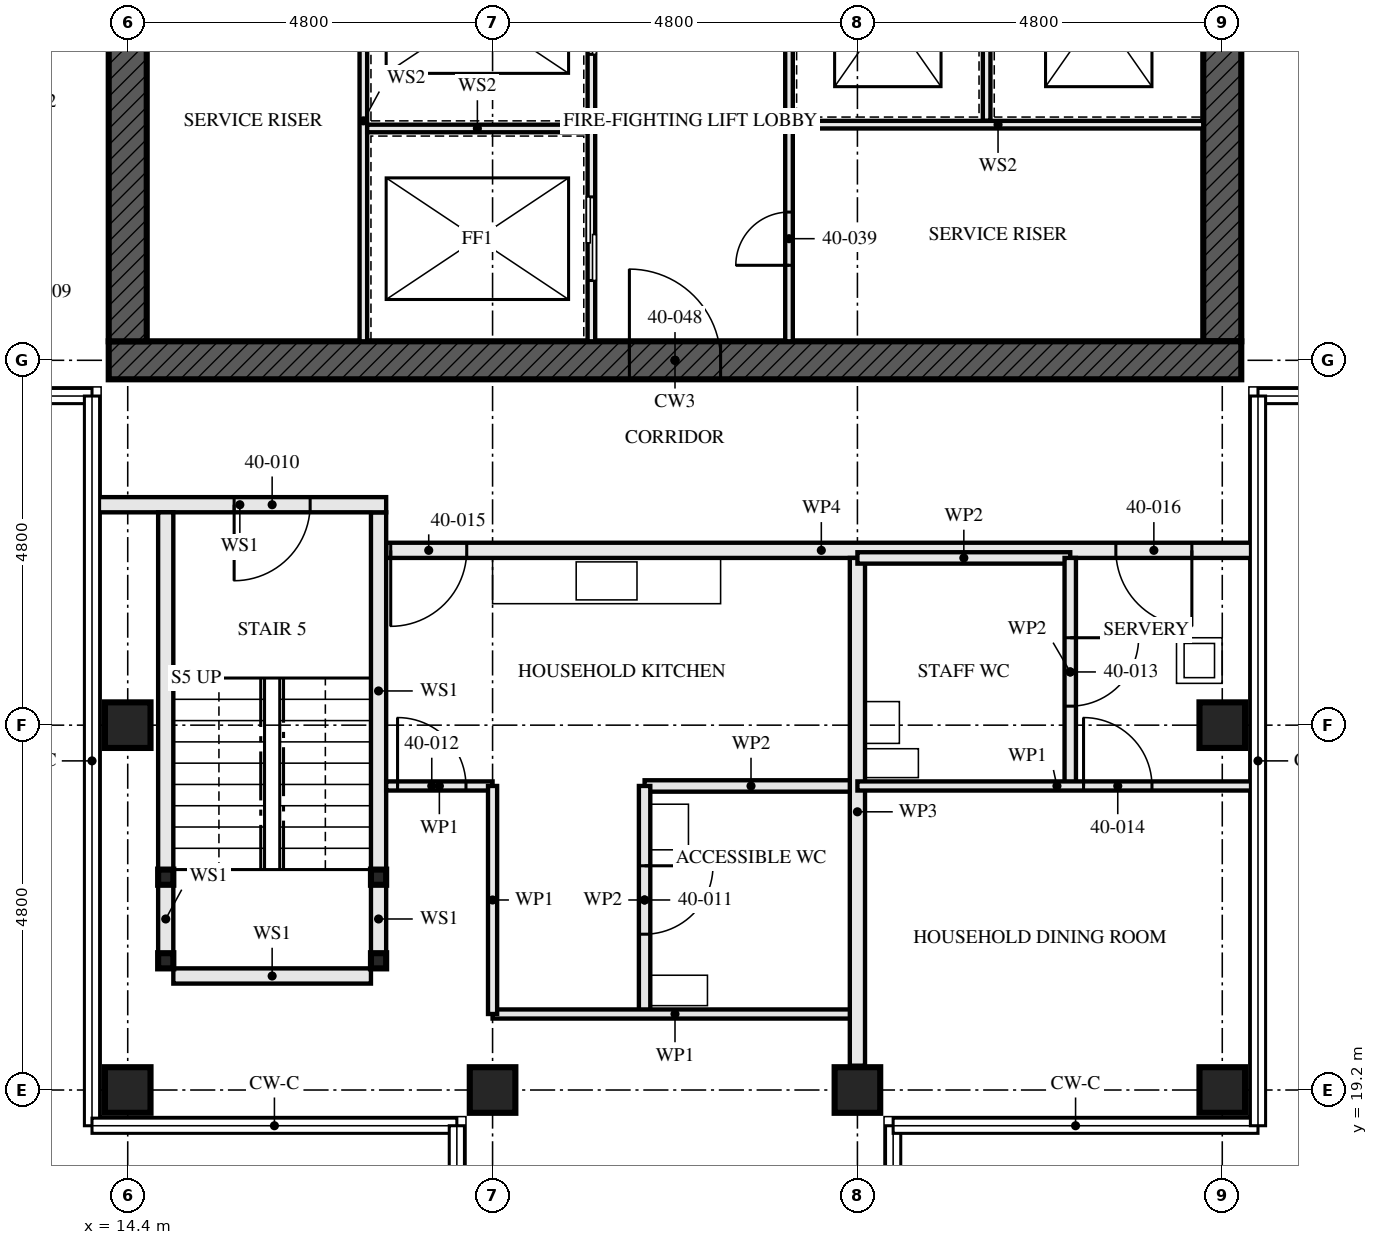
"""IFC4 building model, lengths in metres.
Left out: names, types, materials, properties, quantities, classifications, styles, units other than length and angle.
Written with IfcOpenShell. Run it as: python <this file> out.ifc"""

import sys

from ifc_helpers import new_model, si_unit, direction, frame, frame_2d, origin, origin_2d, place, context, subcontext, project, spatial, rectangle, hollow_rectangle, extrude, element, fill, save


model = new_model("IFC4")
c1 = context("Model", 3, precision=1e-05, world=origin(), true_north=direction((0.0, 1.0)))
c2 = subcontext(c1, "Body", "Model", "MODEL_VIEW")
j1 = project(units=[si_unit("LENGTHUNIT", "METRE"), si_unit("PLANEANGLEUNIT", "RADIAN")], contexts=[c1])
p1 = place(None, origin())
s1 = spatial("IfcSite", under=j1, at=p1, CompositionType="ELEMENT")
p2 = place(p1, origin())
s2 = spatial("IfcBuilding", under=s1, at=p2, CompositionType="ELEMENT")
p3 = place(p2, frame((0.0, 0.0, 148.0)))
s3 = spatial("IfcBuildingStorey", under=s2, at=p3, CompositionType="ELEMENT", Elevation=148.0)
for number, where, z_axis, x_axis in (
    (1, (14.4, 19.2, 0.0), (0.0, 0.0, 1.0), (0.0, 1.0, 0.0)),
    (2, (14.4, 24.0, 0.0), (0.0, 0.0, 1.0), (1.0, 0.0, 0.0)),
    (3, (19.2, 19.2, 0.0), (0.0, 0.0, 1.0), (0.0, 1.0, 0.0)),
    (4, (24.0, 19.2, 0.0), (0.0, 0.0, 1.0), (0.0, 1.0, 0.0)),
    (5, (28.8, 19.2, 0.0), (0.0, 0.0, 1.0), (0.0, 1.0, 0.0)),
    (6, (28.8, 24.0, 0.0), (0.0, 0.0, 1.0), (1.0, 0.0, 0.0)),
):
    element("IfcColumn", number, at=place(p3, frame(where, z_axis=z_axis, x_axis=x_axis)), inside=s3, PredefinedType="COLUMN", context=c2, shape_type="SweptSolid", body=[
        extrude(hollow_rectangle(XDim=0.6, YDim=0.6, WallThickness=0.08, at=origin_2d()), origin(), (0.0, 0.0, 1.0), 3.5),
    ])
p4 = place(p3, frame((14.15, 28.8, -0.17), z_axis=(0.0, 0.0, 1.0), x_axis=(1.0, 0.0, 0.0)))
e7 = element("IfcWall", 7, at=p4, inside=s3, PredefinedType="SHEAR", context=c2, shape_type="SweptSolid", body=[
    extrude(rectangle(XDim=14.9, YDim=0.5, at=frame_2d((7.45, 0.0))), origin(), (0.0, 0.0, 1.0), 3.5),
])
p5 = place(p4, frame((6.85, 0.0, 0.17)))
e8 = element("IfcOpeningElement", 8, at=p5, cuts=e7, PredefinedType="OPENING", context=c2, shape_type="SweptSolid", body=[
    extrude(rectangle(XDim=1.2, YDim=2.1, at=frame_2d((0.6, 1.05))), frame((0.0, 0.26, 0.0), z_axis=(0.0, -1.0, 0.0), x_axis=(1.0, 0.0, 0.0)), (0.0, 0.0, 1.0), 0.521),
])
p6 = place(p3, frame((14.4, 42.95, -0.17), z_axis=(0.0, 0.0, 1.0), x_axis=(0.0, -1.0, 0.0)))
e9 = element("IfcWall", 9, at=p6, inside=s3, PredefinedType="SHEAR", context=c2, shape_type="SweptSolid", body=[
    extrude(rectangle(XDim=13.9, YDim=0.5, at=frame_2d((6.95, 0.0))), origin(), (0.0, 0.0, 1.0), 3.5),
])
p7 = place(p6, frame((6.35, 0.0, 0.17)))
e10 = element("IfcOpeningElement", 10, at=p7, cuts=e9, PredefinedType="OPENING", context=c2, shape_type="SweptSolid", body=[
    extrude(rectangle(XDim=1.2, YDim=2.1, at=frame_2d((0.6, 1.05))), frame((0.0, 0.26, 0.0), z_axis=(0.0, -1.0, 0.0), x_axis=(1.0, 0.0, 0.0)), (0.0, 0.0, 1.0), 0.521),
])
p8 = place(p3, frame((28.8, 29.05, -0.17), z_axis=(0.0, 0.0, 1.0), x_axis=(0.0, 1.0, 0.0)))
e11 = element("IfcWall", 11, at=p8, inside=s3, PredefinedType="SHEAR", context=c2, shape_type="SweptSolid", body=[
    extrude(rectangle(XDim=13.9, YDim=0.5, at=frame_2d((6.95, 0.0))), origin(), (0.0, 0.0, 1.0), 3.5),
])
p9 = place(p8, frame((6.35, 0.0, 0.17)))
e12 = element("IfcOpeningElement", 12, at=p9, cuts=e11, PredefinedType="OPENING", context=c2, shape_type="SweptSolid", body=[
    extrude(rectangle(XDim=1.2, YDim=2.1, at=frame_2d((0.6, 1.05))), frame((0.0, 0.26, 0.0), z_axis=(0.0, -1.0, 0.0), x_axis=(1.0, 0.0, 0.0)), (0.0, 0.0, 1.0), 0.521),
])
for number, where, z_axis, x_axis in (
    (13, (14.9, 20.9, 0.0), (0.0, 0.0, 1.0), (1.0, 0.0, 0.0)),
    (14, (17.7, 20.9, 0.0), (0.0, 0.0, 1.0), (1.0, 0.0, 0.0)),
    (15, (14.9, 22.0, 0.0), (0.0, 0.0, 1.0), (1.0, 0.0, 0.0)),
    (16, (17.7, 22.0, 0.0), (0.0, 0.0, 1.0), (1.0, 0.0, 0.0)),
):
    element("IfcColumn", number, at=place(p3, frame(where, z_axis=z_axis, x_axis=x_axis)), inside=s3, PredefinedType="COLUMN", context=c2, shape_type="SweptSolid", body=[
        extrude(hollow_rectangle(XDim=0.2, YDim=0.2, WallThickness=0.008, at=origin_2d()), origin(), (0.0, 0.0, 1.0), 3.33),
    ])
p10 = place(p3, frame((14.9, 21.0, 0.0), z_axis=(0.0, 0.0, 1.0), x_axis=(0.0, 1.0, 0.0)))
e17 = element("IfcWall", 17, at=p10, inside=s3, PredefinedType="SOLIDWALL", context=c2, shape_type="SweptSolid", body=[
    extrude(rectangle(XDim=0.9, YDim=0.2, at=frame_2d((0.45, 0.0))), origin(), (0.0, 0.0, 1.0), 2.99),
])
p11 = place(p3, frame((14.9, 22.1, 0.0), z_axis=(0.0, 0.0, 1.0), x_axis=(0.0, 1.0, 0.0)))
e18 = element("IfcWall", 18, at=p11, inside=s3, PredefinedType="SOLIDWALL", context=c2, shape_type="SweptSolid", body=[
    extrude(rectangle(XDim=4.7, YDim=0.2, at=frame_2d((2.35, 0.0))), origin(), (0.0, 0.0, 1.0), 2.99),
])
p12 = place(p3, frame((17.7, 21.0, 0.0), z_axis=(0.0, 0.0, 1.0), x_axis=(0.0, 1.0, 0.0)))
e19 = element("IfcWall", 19, at=p12, inside=s3, PredefinedType="SOLIDWALL", context=c2, shape_type="SweptSolid", body=[
    extrude(rectangle(XDim=0.9, YDim=0.2, at=frame_2d((0.45, 0.0))), origin(), (0.0, 0.0, 1.0), 2.99),
])
p13 = place(p3, frame((17.7, 22.1, 0.0), z_axis=(0.0, 0.0, 1.0), x_axis=(0.0, 1.0, 0.0)))
e20 = element("IfcWall", 20, at=p13, inside=s3, PredefinedType="SOLIDWALL", context=c2, shape_type="SweptSolid", body=[
    extrude(rectangle(XDim=4.7, YDim=0.2, at=frame_2d((2.35, 0.0))), origin(), (0.0, 0.0, 1.0), 2.99),
])
p14 = place(p3, frame((15.0, 20.7, 0.0), z_axis=(0.0, 0.0, 1.0), x_axis=(1.0, 0.0, 0.0)))
e21 = element("IfcWall", 21, at=p14, inside=s3, PredefinedType="SOLIDWALL", context=c2, shape_type="SweptSolid", body=[
    extrude(rectangle(XDim=2.6, YDim=0.2, at=frame_2d((1.3, 0.0))), origin(), (0.0, 0.0, 1.0), 3.33),
])
p15 = place(p3, frame((13.95, 26.9, 0.0), z_axis=(0.0, 0.0, 1.0), x_axis=(1.0, 0.0, 0.0)))
e22 = element("IfcWall", 22, at=p15, inside=s3, PredefinedType="SOLIDWALL", context=c2, shape_type="SweptSolid", body=[
    extrude(rectangle(XDim=3.85, YDim=0.2, at=frame_2d((1.925, 0.0))), origin(), (0.0, 0.0, 1.0), 2.32),
])
p16 = place(p15, frame((1.85, 0.0, 0.0)))
e23 = element("IfcOpeningElement", 23, at=p16, cuts=e22, PredefinedType="OPENING", context=c2, shape_type="SweptSolid", body=[
    extrude(rectangle(XDim=1.0, YDim=2.1, at=frame_2d((0.5, 1.05))), frame((0.0, 0.111, 0.0), z_axis=(0.0, -1.0, 0.0), x_axis=(1.0, 0.0, 0.0)), (0.0, 0.0, 1.0), 0.221),
])
p17 = place(p3, frame((21.2, 20.2, 0.0), z_axis=(0.0, 0.0, 1.0), x_axis=(0.0, 1.0, 0.0)))
e24 = element("IfcWall", 24, at=p17, inside=s3, PredefinedType="PARTITIONING", context=c2, shape_type="SweptSolid", body=[
    extrude(rectangle(XDim=3.0, YDim=0.15, at=frame_2d((1.5, 0.0))), origin(), (0.0, 0.0, 1.0), 3.33),
])
p18 = place(p17, frame((1.05, 0.0, 0.0)))
e25 = element("IfcOpeningElement", 25, at=p18, cuts=e24, PredefinedType="OPENING", context=c2, shape_type="SweptSolid", body=[
    extrude(rectangle(XDim=0.9, YDim=2.1, at=frame_2d((0.45, 1.05))), frame((0.0, 0.085, 0.0), z_axis=(0.0, -1.0, 0.0), x_axis=(1.0, 0.0, 0.0)), (0.0, 0.0, 1.0), 0.171),
])
p19 = place(p3, frame((21.2, 23.2, 0.0), z_axis=(0.0, 0.0, 1.0), x_axis=(1.0, 0.0, 0.0)))
e26 = element("IfcWall", 26, at=p19, inside=s3, PredefinedType="PARTITIONING", context=c2, shape_type="SweptSolid", body=[
    extrude(rectangle(XDim=2.8, YDim=0.15, at=frame_2d((1.4, 0.0))), origin(), (0.0, 0.0, 1.0), 3.33),
])
p20 = place(p3, frame((17.8, 23.2, 0.0), z_axis=(0.0, 0.0, 1.0), x_axis=(1.0, 0.0, 0.0)))
e27 = element("IfcWall", 27, at=p20, inside=s3, PredefinedType="PARTITIONING", context=c2, shape_type="SweptSolid", body=[
    extrude(rectangle(XDim=1.4, YDim=0.12, at=frame_2d((0.7, 0.0))), origin(), (0.0, 0.0, 1.0), 3.33),
])
p21 = place(p20, frame((0.15, 0.0, 0.0)))
e28 = element("IfcOpeningElement", 28, at=p21, cuts=e27, PredefinedType="OPENING", context=c2, shape_type="SweptSolid", body=[
    extrude(rectangle(XDim=0.9, YDim=2.1, at=frame_2d((0.45, 1.05))), frame((0.0, 0.071, 0.0), z_axis=(0.0, -1.0, 0.0), x_axis=(1.0, 0.0, 0.0)), (0.0, 0.0, 1.0), 0.141),
])
p22 = place(p3, frame((19.2, 20.2, 0.0), z_axis=(0.0, 0.0, 1.0), x_axis=(1.0, 0.0, 0.0)))
e29 = element("IfcWall", 29, at=p22, inside=s3, PredefinedType="PARTITIONING", context=c2, shape_type="SweptSolid", body=[
    extrude(rectangle(XDim=4.8, YDim=0.12, at=frame_2d((2.4, 0.0))), origin(), (0.0, 0.0, 1.0), 3.33),
])
p23 = place(p3, frame((19.2, 20.2, 0.0), z_axis=(0.0, 0.0, 1.0), x_axis=(0.0, 1.0, 0.0)))
e30 = element("IfcWall", 30, at=p23, inside=s3, PredefinedType="PARTITIONING", context=c2, shape_type="SweptSolid", body=[
    extrude(rectangle(XDim=3.0, YDim=0.12, at=frame_2d((1.5, 0.0))), origin(), (0.0, 0.0, 1.0), 2.55),
])
p24 = place(p3, frame((24.0, 19.52, 0.0), z_axis=(0.0, 0.0, 1.0), x_axis=(0.0, 1.0, 0.0)))
e31 = element("IfcWall", 31, at=p24, inside=s3, PredefinedType="PARTITIONING", context=c2, shape_type="SweptSolid", body=[
    extrude(rectangle(XDim=6.68, YDim=0.2, at=frame_2d((3.34, 0.0))), origin(), (0.0, 0.0, 1.0), 2.55),
])
p25 = place(p3, frame((26.8, 23.2, 0.0), z_axis=(0.0, 0.0, 1.0), x_axis=(0.0, 1.0, 0.0)))
e32 = element("IfcWall", 32, at=p25, inside=s3, PredefinedType="PARTITIONING", context=c2, shape_type="SweptSolid", body=[
    extrude(rectangle(XDim=3.0, YDim=0.15, at=frame_2d((1.5, 0.0))), origin(), (0.0, 0.0, 1.0), 2.55),
])
p26 = place(p25, frame((1.05, 0.0, 0.0)))
e33 = element("IfcOpeningElement", 33, at=p26, cuts=e32, PredefinedType="OPENING", context=c2, shape_type="SweptSolid", body=[
    extrude(rectangle(XDim=0.9, YDim=2.1, at=frame_2d((0.45, 1.05))), frame((0.0, 0.085, 0.0), z_axis=(0.0, -1.0, 0.0), x_axis=(1.0, 0.0, 0.0)), (0.0, 0.0, 1.0), 0.171),
])
p27 = place(p3, frame((24.0, 26.2, 0.0), z_axis=(0.0, 0.0, 1.0), x_axis=(1.0, 0.0, 0.0)))
e34 = element("IfcWall", 34, at=p27, inside=s3, PredefinedType="PARTITIONING", context=c2, shape_type="SweptSolid", body=[
    extrude(rectangle(XDim=2.8, YDim=0.15, at=frame_2d((1.4, 0.0))), origin(), (0.0, 0.0, 1.0), 3.33),
])
p28 = place(p3, frame((24.0, 23.2, 0.0), z_axis=(0.0, 0.0, 1.0), x_axis=(1.0, 0.0, 0.0)))
e35 = element("IfcWall", 35, at=p28, inside=s3, PredefinedType="PARTITIONING", context=c2, shape_type="SweptSolid", body=[
    extrude(rectangle(XDim=5.25, YDim=0.12, at=frame_2d((2.625, 0.0))), origin(), (0.0, 0.0, 1.0), 2.32),
])
p29 = place(p28, frame((2.975, 0.0, 0.0)))
e36 = element("IfcOpeningElement", 36, at=p29, cuts=e35, PredefinedType="OPENING", context=c2, shape_type="SweptSolid", body=[
    extrude(rectangle(XDim=0.9, YDim=2.1, at=frame_2d((0.45, 1.05))), frame((0.0, 0.071, 0.0), z_axis=(0.0, -1.0, 0.0), x_axis=(1.0, 0.0, 0.0)), (0.0, 0.0, 1.0), 0.141),
])
p30 = place(p3, frame((17.8, 26.3, 0.0), z_axis=(0.0, 0.0, 1.0), x_axis=(1.0, 0.0, 0.0)))
e37 = element("IfcWall", 37, at=p30, inside=s3, PredefinedType="PARTITIONING", context=c2, shape_type="SweptSolid", body=[
    extrude(rectangle(XDim=11.45, YDim=0.2, at=frame_2d((5.725, 0.0))), origin(), (0.0, 0.0, 1.0), 2.32),
])
p31 = place(p30, frame((0.06, 0.0, 0.0)))
e38 = element("IfcOpeningElement", 38, at=p31, cuts=e37, PredefinedType="OPENING", context=c2, shape_type="SweptSolid", body=[
    extrude(rectangle(XDim=1.0, YDim=2.1, at=frame_2d((0.5, 1.05))), frame((0.0, 0.111, 0.0), z_axis=(0.0, -1.0, 0.0), x_axis=(1.0, 0.0, 0.0)), (0.0, 0.0, 1.0), 0.221),
])
p32 = place(p30, frame((9.6, 0.0, 0.0)))
e39 = element("IfcOpeningElement", 39, at=p32, cuts=e37, PredefinedType="OPENING", context=c2, shape_type="SweptSolid", body=[
    extrude(rectangle(XDim=1.0, YDim=2.1, at=frame_2d((0.5, 1.05))), frame((0.0, 0.111, 0.0), z_axis=(0.0, -1.0, 0.0), x_axis=(1.0, 0.0, 0.0)), (0.0, 0.0, 1.0), 0.221),
])
p33 = place(p3, frame((20.5, 29.05, 0.0), z_axis=(0.0, 0.0, 1.0), x_axis=(0.0, 1.0, 0.0)))
e40 = element("IfcWall", 40, at=p33, inside=s3, PredefinedType="SOLIDWALL", context=c2, shape_type="SweptSolid", body=[
    extrude(rectangle(XDim=5.8, YDim=0.1, at=frame_2d((2.9, 0.0))), origin(), (0.0, 0.0, 1.0), 3.33),
])
p34 = place(p33, frame((0.8, 0.0, 0.0)))
e41 = element("IfcOpeningElement", 41, at=p34, cuts=e40, PredefinedType="OPENING", context=c2, shape_type="SweptSolid", body=[
    extrude(rectangle(XDim=1.1, YDim=2.3, at=frame_2d((0.55, 1.15))), frame((0.0, 0.061, 0.0), z_axis=(0.0, -1.0, 0.0), x_axis=(1.0, 0.0, 0.0)), (0.0, 0.0, 1.0), 0.121),
])
p35 = place(p33, frame((3.775, 0.0, 0.0)))
e42 = element("IfcOpeningElement", 42, at=p35, cuts=e40, PredefinedType="OPENING", context=c2, shape_type="SweptSolid", body=[
    extrude(rectangle(XDim=1.1, YDim=2.3, at=frame_2d((0.55, 1.15))), frame((0.0, 0.061, 0.0), z_axis=(0.0, -1.0, 0.0), x_axis=(1.0, 0.0, 0.0)), (0.0, 0.0, 1.0), 0.121),
])
p36 = place(p3, frame((23.1, 29.05, 0.0), z_axis=(0.0, 0.0, 1.0), x_axis=(0.0, 1.0, 0.0)))
e43 = element("IfcWall", 43, at=p36, inside=s3, PredefinedType="SOLIDWALL", context=c2, shape_type="SweptSolid", body=[
    extrude(rectangle(XDim=5.8, YDim=0.1, at=frame_2d((2.9, 0.0))), origin(), (0.0, 0.0, 1.0), 3.33),
])
p37 = place(p36, frame((1.0, 0.0, 0.0)))
e44 = element("IfcOpeningElement", 44, at=p37, cuts=e43, PredefinedType="OPENING", context=c2, shape_type="SweptSolid", body=[
    extrude(rectangle(XDim=0.7, YDim=2.1, at=frame_2d((0.35, 1.05))), frame((0.0, 0.061, 0.0), z_axis=(0.0, -1.0, 0.0), x_axis=(1.0, 0.0, 0.0)), (0.0, 0.0, 1.0), 0.121),
])
p38 = place(p3, frame((17.5, 29.05, 0.0), z_axis=(0.0, 0.0, 1.0), x_axis=(0.0, 1.0, 0.0)))
e45 = element("IfcWall", 45, at=p38, inside=s3, PredefinedType="SOLIDWALL", context=c2, shape_type="SweptSolid", body=[
    extrude(rectangle(XDim=5.8, YDim=0.1, at=frame_2d((2.9, 0.0))), origin(), (0.0, 0.0, 1.0), 3.33),
])
p39 = place(p3, frame((17.55, 31.85, 0.0), z_axis=(0.0, 0.0, 1.0), x_axis=(1.0, 0.0, 0.0)))
e46 = element("IfcWall", 46, at=p39, inside=s3, PredefinedType="SOLIDWALL", context=c2, shape_type="SweptSolid", body=[
    extrude(rectangle(XDim=2.9, YDim=0.1, at=frame_2d((1.45, 0.0))), origin(), (0.0, 0.0, 1.0), 3.33),
])
p40 = place(p3, frame((25.7, 31.95, 0.0), z_axis=(0.0, 0.0, 1.0), x_axis=(0.0, 1.0, 0.0)))
e47 = element("IfcWall", 47, at=p40, inside=s3, PredefinedType="SOLIDWALL", context=c2, shape_type="SweptSolid", body=[
    extrude(rectangle(XDim=2.9, YDim=0.1, at=frame_2d((1.45, 0.0))), origin(), (0.0, 0.0, 1.0), 3.33),
])
p41 = place(p3, frame((23.15, 31.9, 0.0), z_axis=(0.0, 0.0, 1.0), x_axis=(1.0, 0.0, 0.0)))
e48 = element("IfcWall", 48, at=p41, inside=s3, PredefinedType="SOLIDWALL", context=c2, shape_type="SweptSolid", body=[
    extrude(rectangle(XDim=5.4, YDim=0.1, at=frame_2d((2.7, 0.0))), origin(), (0.0, 0.0, 1.0), 3.33),
])
p42 = place(p16, frame((1.0, 0.0, 0.0), z_axis=(0.0, 0.0, 1.0), x_axis=(-1.0, 0.0, 0.0)))
e49 = element("IfcDoor", 49, at=p42, inside=s3, OperationType="SINGLE_SWING_LEFT", PredefinedType="DOOR", context=c2, shape_type="SweptSolid", body=[
    extrude(rectangle(XDim=1.0, YDim=2.1, at=frame_2d((0.5, 1.05))), frame((0.0, 0.032, 0.0), z_axis=(0.0, -1.0, 0.0), x_axis=(1.0, 0.0, 0.0)), (0.0, 0.0, 1.0), 0.064),
])
fill(e23, e49)
p43 = place(p18, frame((0.9, 0.0, 0.0), z_axis=(0.0, 0.0, 1.0), x_axis=(-1.0, 0.0, 0.0)))
e50 = element("IfcDoor", 50, at=p43, inside=s3, OperationType="SINGLE_SWING_RIGHT", PredefinedType="DOOR", context=c2, shape_type="SweptSolid", body=[
    extrude(rectangle(XDim=0.9, YDim=2.1, at=frame_2d((0.45, 1.05))), frame((0.0, 0.022, 0.0), z_axis=(0.0, -1.0, 0.0), x_axis=(1.0, 0.0, 0.0)), (0.0, 0.0, 1.0), 0.044),
])
fill(e25, e50)
p44 = place(p21, origin())
e51 = element("IfcDoor", 51, at=p44, inside=s3, OperationType="SINGLE_SWING_RIGHT", PredefinedType="DOOR", context=c2, shape_type="SweptSolid", body=[
    extrude(rectangle(XDim=0.9, YDim=2.1, at=frame_2d((0.45, 1.05))), frame((0.0, 0.022, 0.0), z_axis=(0.0, -1.0, 0.0), x_axis=(1.0, 0.0, 0.0)), (0.0, 0.0, 1.0), 0.044),
])
fill(e28, e51)
p45 = place(p26, frame((0.9, 0.0, 0.0), z_axis=(0.0, 0.0, 1.0), x_axis=(-1.0, 0.0, 0.0)))
e52 = element("IfcDoor", 52, at=p45, inside=s3, OperationType="SINGLE_SWING_RIGHT", PredefinedType="DOOR", context=c2, shape_type="SweptSolid", body=[
    extrude(rectangle(XDim=0.9, YDim=2.1, at=frame_2d((0.45, 1.05))), frame((0.0, 0.022, 0.0), z_axis=(0.0, -1.0, 0.0), x_axis=(1.0, 0.0, 0.0)), (0.0, 0.0, 1.0), 0.044),
])
fill(e33, e52)
p46 = place(p29, origin())
e53 = element("IfcDoor", 53, at=p46, inside=s3, OperationType="SINGLE_SWING_RIGHT", PredefinedType="DOOR", context=c2, shape_type="SweptSolid", body=[
    extrude(rectangle(XDim=0.9, YDim=2.1, at=frame_2d((0.45, 1.05))), frame((0.0, 0.022, 0.0), z_axis=(0.0, -1.0, 0.0), x_axis=(1.0, 0.0, 0.0)), (0.0, 0.0, 1.0), 0.044),
])
fill(e36, e53)
p47 = place(p31, frame((1.0, 0.0, 0.0), z_axis=(0.0, 0.0, 1.0), x_axis=(-1.0, 0.0, 0.0)))
e54 = element("IfcDoor", 54, at=p47, inside=s3, OperationType="SINGLE_SWING_LEFT", PredefinedType="DOOR", context=c2, shape_type="SweptSolid", body=[
    extrude(rectangle(XDim=1.0, YDim=2.1, at=frame_2d((0.5, 1.05))), frame((0.0, 0.027, 0.0), z_axis=(0.0, -1.0, 0.0), x_axis=(1.0, 0.0, 0.0)), (0.0, 0.0, 1.0), 0.054),
])
fill(e38, e54)
p48 = place(p32, frame((1.0, 0.0, 0.0), z_axis=(0.0, 0.0, 1.0), x_axis=(-1.0, 0.0, 0.0)))
e55 = element("IfcDoor", 55, at=p48, inside=s3, OperationType="SINGLE_SWING_RIGHT", PredefinedType="DOOR", context=c2, shape_type="SweptSolid", body=[
    extrude(rectangle(XDim=1.0, YDim=2.1, at=frame_2d((0.5, 1.05))), frame((0.0, 0.027, 0.0), z_axis=(0.0, -1.0, 0.0), x_axis=(1.0, 0.0, 0.0)), (0.0, 0.0, 1.0), 0.054),
])
fill(e39, e55)
p49 = place(p34, origin())
e56 = element("IfcDoor", 56, at=p49, inside=s3, OperationType="SLIDING_TO_LEFT", PredefinedType="DOOR", context=c2, shape_type="SweptSolid", body=[
    extrude(rectangle(XDim=1.1, YDim=2.3, at=frame_2d((0.55, 1.15))), frame((0.0, 0.05, 0.0), z_axis=(0.0, -1.0, 0.0), x_axis=(1.0, 0.0, 0.0)), (0.0, 0.0, 1.0), 0.1),
])
fill(e41, e56)
p50 = place(p35, origin())
e57 = element("IfcDoor", 57, at=p50, inside=s3, OperationType="SLIDING_TO_LEFT", PredefinedType="DOOR", context=c2, shape_type="SweptSolid", body=[
    extrude(rectangle(XDim=1.1, YDim=2.3, at=frame_2d((0.55, 1.15))), frame((0.0, 0.05, 0.0), z_axis=(0.0, -1.0, 0.0), x_axis=(1.0, 0.0, 0.0)), (0.0, 0.0, 1.0), 0.1),
])
fill(e42, e57)
p51 = place(p37, origin())
e58 = element("IfcDoor", 58, at=p51, inside=s3, OperationType="SINGLE_SWING_RIGHT", PredefinedType="DOOR", context=c2, shape_type="SweptSolid", body=[
    extrude(rectangle(XDim=0.7, YDim=2.1, at=frame_2d((0.35, 1.05))), frame((0.0, 0.027, 0.0), z_axis=(0.0, -1.0, 0.0), x_axis=(1.0, 0.0, 0.0)), (0.0, 0.0, 1.0), 0.054),
])
fill(e44, e58)
p52 = place(p5, origin())
e59 = element("IfcDoor", 59, at=p52, inside=s3, OperationType="SINGLE_SWING_LEFT", PredefinedType="DOOR", context=c2, shape_type="SweptSolid", body=[
    extrude(rectangle(XDim=1.2, YDim=2.1, at=frame_2d((0.6, 1.05))), frame((0.0, 0.027, 0.0), z_axis=(0.0, -1.0, 0.0), x_axis=(1.0, 0.0, 0.0)), (0.0, 0.0, 1.0), 0.054),
])
fill(e8, e59)
save(model, sys.argv[1])
